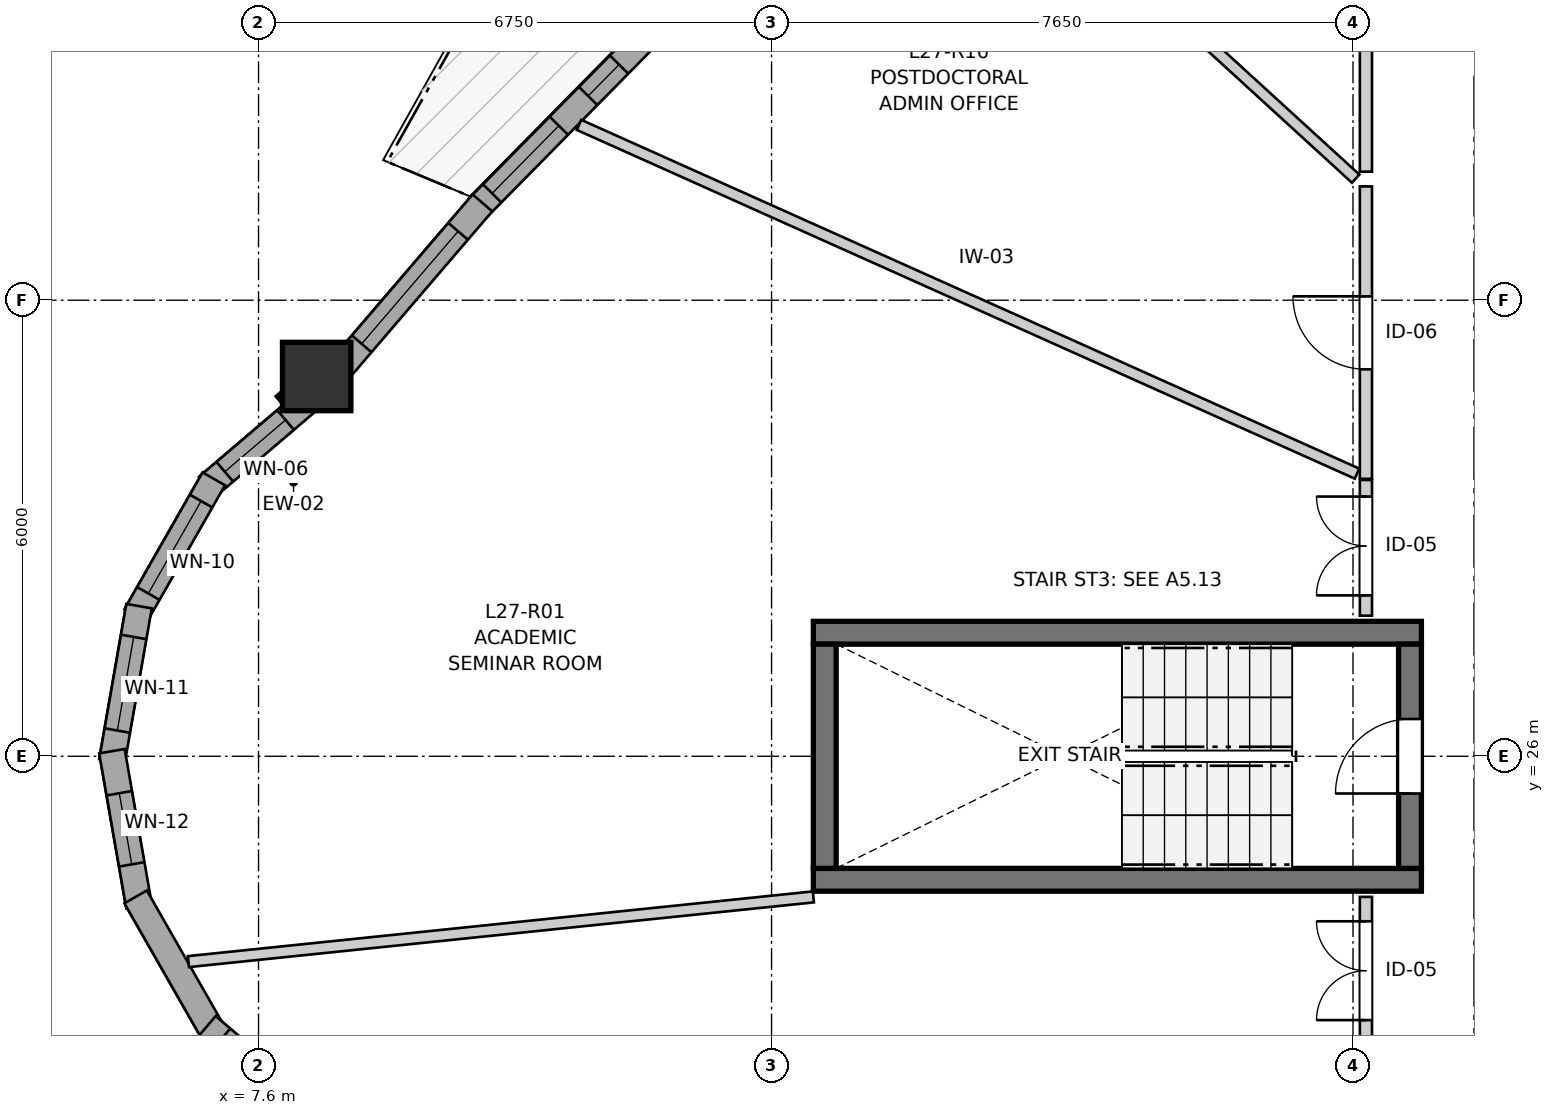
"""IFC4 building model, lengths in metres.
Left out: names, types, materials, properties, quantities, classifications, styles, units other than length and angle.
Written with IfcOpenShell. Run it as: python <this file> out.ifc"""

import sys

from ifc_helpers import new_model, si_unit, direction, frame, frame_2d, origin, origin_2d, place, context, subcontext, project, spatial, rectangle, extrude, source, transform, mapped, element, fill, save


model = new_model("IFC4")
c1 = context("Model", 3, precision=1e-05, world=origin(), true_north=direction((0.0, 1.0)))
c2 = subcontext(c1, "Body", "Model", "MODEL_VIEW")
j1 = project(units=[si_unit("LENGTHUNIT", "METRE"), si_unit("PLANEANGLEUNIT", "RADIAN")], contexts=[c1])
p1 = place(None, origin())
s1 = spatial("IfcSite", under=j1, at=p1, CompositionType="ELEMENT")
p2 = place(p1, origin())
s2 = spatial("IfcBuilding", under=s1, at=p2, CompositionType="ELEMENT")
p3 = place(p2, frame((0.0, 0.0, 92.8)))
s3 = spatial("IfcBuildingStorey", under=s2, at=p3, CompositionType="ELEMENT", Elevation=92.8)
for number, where, z_axis, x_axis in (
    (1, (14.9, 24.375, 0.0), (0.0, 0.0, 1.0), (1.0, 0.0, 0.0)),
    (2, (22.9, 27.625, 0.0), (0.0, 0.0, 1.0), (-1.0, 0.0, 0.0)),
):
    element("IfcWall", number, at=place(p3, frame(where, z_axis=z_axis, x_axis=x_axis)), inside=s3, PredefinedType="SHEAR", context=c2, shape_type="SweptSolid", body=[
        extrude(rectangle(XDim=8.0, YDim=0.3, at=frame_2d((4.0, 0.0))), origin(), (0.0, 0.0, 1.0), 2.95),
    ])
p4 = place(p3, frame((15.05, 27.475, 0.0), z_axis=(0.0, 0.0, 1.0), x_axis=(0.0, -1.0, 0.0)))
e3 = element("IfcWall", 3, at=p4, inside=s3, PredefinedType="SHEAR", context=c2, shape_type="SweptSolid", body=[
    extrude(rectangle(XDim=2.95, YDim=0.3, at=frame_2d((1.475, 0.0))), origin(), (0.0, 0.0, 1.0), 2.95),
])
p5 = place(p3, frame((22.75, 24.525, 0.0), z_axis=(0.0, 0.0, 1.0), x_axis=(0.0, 1.0, 0.0)))
e4 = element("IfcWall", 4, at=p5, inside=s3, PredefinedType="SHEAR", context=c2, shape_type="SweptSolid", body=[
    extrude(rectangle(XDim=2.95, YDim=0.3, at=frame_2d((1.475, 0.0))), origin(), (0.0, 0.0, 1.0), 2.95),
])
p6 = place(p5, frame((0.985, 0.0, 0.0)))
e5 = element("IfcOpeningElement", 5, at=p6, cuts=e4, PredefinedType="OPENING", context=c2, shape_type="SweptSolid", body=[
    extrude(rectangle(XDim=0.98, YDim=2.15, at=frame_2d((0.49, 1.075))), frame((0.0, 0.16, 0.0), z_axis=(0.0, -1.0, 0.0), x_axis=(1.0, 0.0, 0.0)), (0.0, 0.0, 1.0), 0.32),
])
m1 = source(origin(), c2, "Body", "SweptSolid", [
    extrude(rectangle(XDim=0.9, YDim=0.9, at=origin_2d()), origin(), (0.0, 0.0, 1.0), 2.95),
])
p7 = place(p3, frame((8.365, 30.996, 0.0), z_axis=(0.0, 0.0, 1.0), x_axis=(1.0, 0.0, 0.0)))
e6 = element("IfcColumn", 6, at=p7, inside=s3, PredefinedType="COLUMN", context=c2, shape_type="MappedRepresentation", body=[
    mapped(m1, transform((0.0, 0.0, 0.0), x_axis=(1.0, 0.0, 0.0), y_axis=(0.0, 1.0, 0.0), z_axis=(0.0, 0.0, 1.0), scale=1.0)),
])
p8 = place(p3, frame((8.3, 30.718, 0.0), z_axis=(0.0, 0.0, 1.0), x_axis=(-0.761191299493, -0.648527413126, 0.0)))
e7 = element("IfcWall", 7, at=p8, inside=s3, PredefinedType="SOLIDWALL", context=c2, shape_type="SweptSolid", body=[
    extrude(rectangle(XDim=1.805, YDim=0.34, at=frame_2d((0.903, 0.0))), origin(), (0.0, 0.0, 1.0), 2.48),
])
p9 = place(p8, frame((0.452, 0.0, 0.82)))
e8 = element("IfcOpeningElement", 8, at=p9, cuts=e7, PredefinedType="OPENING", context=c2, shape_type="SweptSolid", body=[
    extrude(rectangle(XDim=1.05, YDim=1.45, at=frame_2d((0.525, 0.725))), frame((0.0, 0.18, 0.0), z_axis=(0.0, -1.0, 0.0), x_axis=(1.0, 0.0, 0.0)), (0.0, 0.0, 1.0), 0.36),
])
p10 = place(p3, frame((7.011, 29.65, 0.0), z_axis=(0.0, 0.0, 1.0), x_axis=(-0.496037473582, -0.868301114132, 0.0)))
e9 = element("IfcWall", 9, at=p10, inside=s3, PredefinedType="SOLIDWALL", context=c2, shape_type="SweptSolid", body=[
    extrude(rectangle(XDim=2.073, YDim=0.34, at=frame_2d((1.037, 0.0))), origin(), (0.0, 0.0, 1.0), 2.48),
])
p11 = place(p10, frame((0.336, 0.0, 0.82)))
e10 = element("IfcOpeningElement", 10, at=p11, cuts=e9, PredefinedType="OPENING", context=c2, shape_type="SweptSolid", body=[
    extrude(rectangle(XDim=1.4, YDim=1.35, at=frame_2d((0.7, 0.675))), frame((0.0, 0.18, 0.0), z_axis=(0.0, -1.0, 0.0), x_axis=(1.0, 0.0, 0.0)), (0.0, 0.0, 1.0), 0.36),
])
p12 = place(p3, frame((6.028, 27.975, 0.0), z_axis=(0.0, 0.0, 1.0), x_axis=(-0.172186061474, -0.985064444711, 0.0)))
e11 = element("IfcWall", 11, at=p12, inside=s3, PredefinedType="SOLIDWALL", context=c2, shape_type="SweptSolid", body=[
    extrude(rectangle(XDim=2.073, YDim=0.34, at=frame_2d((1.037, 0.0))), origin(), (0.0, 0.0, 1.0), 2.48),
])
p13 = place(p12, frame((0.412, 0.0, 0.82)))
e12 = element("IfcOpeningElement", 12, at=p13, cuts=e11, PredefinedType="OPENING", context=c2, shape_type="SweptSolid", body=[
    extrude(rectangle(XDim=1.25, YDim=1.35, at=frame_2d((0.625, 0.675))), frame((0.0, 0.18, 0.0), z_axis=(0.0, -1.0, 0.0), x_axis=(1.0, 0.0, 0.0)), (0.0, 0.0, 1.0), 0.36),
])
p14 = place(p3, frame((5.671, 26.067, 0.0), z_axis=(0.0, 0.0, 1.0), x_axis=(0.172186061474, -0.985064444711, 0.0)))
e13 = element("IfcWall", 13, at=p14, inside=s3, PredefinedType="SOLIDWALL", context=c2, shape_type="SweptSolid", body=[
    extrude(rectangle(XDim=2.073, YDim=0.34, at=frame_2d((1.037, 0.0))), origin(), (0.0, 0.0, 1.0), 2.48),
])
p15 = place(p14, frame((0.562, 0.0, 0.82)))
e14 = element("IfcOpeningElement", 14, at=p15, cuts=e13, PredefinedType="OPENING", context=c2, shape_type="SweptSolid", body=[
    extrude(rectangle(XDim=0.95, YDim=1.35, at=frame_2d((0.475, 0.675))), frame((0.0, 0.18, 0.0), z_axis=(0.0, -1.0, 0.0), x_axis=(1.0, 0.0, 0.0)), (0.0, 0.0, 1.0), 0.36),
])
p16 = place(p3, frame((5.983, 24.15, 0.0), z_axis=(0.0, 0.0, 1.0), x_axis=(0.496037473582, -0.868301114132, 0.0)))
e15 = element("IfcWall", 15, at=p16, inside=s3, PredefinedType="SOLIDWALL", context=c2, shape_type="SweptSolid", body=[
    extrude(rectangle(XDim=2.073, YDim=0.34, at=frame_2d((1.037, 0.0))), origin(), (0.0, 0.0, 1.0), 2.48),
])
p17 = place(p3, frame((6.926, 22.453, 0.0), z_axis=(0.0, 0.0, 1.0), x_axis=(0.76114353683, -0.648583469063, 0.0)))
e16 = element("IfcWall", 16, at=p17, inside=s3, PredefinedType="SOLIDWALL", context=c2, shape_type="SweptSolid", body=[
    extrude(rectangle(XDim=2.015, YDim=0.34, at=frame_2d((1.007, 0.0))), origin(), (0.0, 0.0, 1.0), 2.48),
])
p18 = place(p17, frame((0.252, 0.0, 0.82)))
e17 = element("IfcOpeningElement", 17, at=p18, cuts=e16, PredefinedType="OPENING", context=c2, shape_type="SweptSolid", body=[
    extrude(rectangle(XDim=1.45, YDim=1.25, at=frame_2d((0.725, 0.625))), frame((0.0, 0.18, 0.0), z_axis=(0.0, -1.0, 0.0), x_axis=(1.0, 0.0, 0.0)), (0.0, 0.0, 1.0), 0.36),
])
p19 = place(p3, frame((12.641, 35.401, 0.0), z_axis=(0.0, 0.0, 1.0), x_axis=(-0.701955968499, -0.712220343917, 0.0)))
e18 = element("IfcWall", 18, at=p19, inside=s3, PredefinedType="SOLIDWALL", context=c2, shape_type="SweptSolid", body=[
    extrude(rectangle(XDim=3.068, YDim=0.34, at=frame_2d((1.534, 0.0))), origin(), (0.0, 0.0, 1.0), 2.48),
])
p20 = place(p19, frame((0.423, 0.0, 0.82)))
e19 = element("IfcOpeningElement", 19, at=p20, cuts=e18, PredefinedType="OPENING", context=c2, shape_type="SweptSolid", body=[
    extrude(rectangle(XDim=0.58, YDim=1.35, at=frame_2d((0.29, 0.675))), frame((0.0, 0.18, 0.0), z_axis=(0.0, -1.0, 0.0), x_axis=(1.0, 0.0, 0.0)), (0.0, 0.0, 1.0), 0.36),
])
p21 = place(p19, frame((1.552, 0.0, 0.82)))
e20 = element("IfcOpeningElement", 20, at=p21, cuts=e18, PredefinedType="OPENING", context=c2, shape_type="SweptSolid", body=[
    extrude(rectangle(XDim=1.25, YDim=1.35, at=frame_2d((0.625, 0.675))), frame((0.0, 0.18, 0.0), z_axis=(0.0, -1.0, 0.0), x_axis=(1.0, 0.0, 0.0)), (0.0, 0.0, 1.0), 0.36),
])
p22 = place(p3, frame((10.546, 33.28, 0.0), z_axis=(0.0, 0.0, 1.0), x_axis=(-0.6506950883, -0.759339121909, 0.0)))
e21 = element("IfcWall", 21, at=p22, inside=s3, PredefinedType="SOLIDWALL", context=c2, shape_type="SweptSolid", body=[
    extrude(rectangle(XDim=2.924, YDim=0.34, at=frame_2d((1.462, 0.0))), origin(), (0.0, 0.0, 1.0), 2.48),
])
p23 = place(p22, frame((0.492, 0.0, 0.82)))
e22 = element("IfcOpeningElement", 22, at=p23, cuts=e21, PredefinedType="OPENING", context=c2, shape_type="SweptSolid", body=[
    extrude(rectangle(XDim=1.95, YDim=1.4, at=frame_2d((0.975, 0.7))), frame((0.0, 0.18, 0.0), z_axis=(0.0, -1.0, 0.0), x_axis=(1.0, 0.0, 0.0)), (0.0, 0.0, 1.0), 0.36),
])
p24 = place(p3, frame((22.17, 29.65, 0.0), z_axis=(0.0, 0.0, 1.0), x_axis=(0.0, 1.0, 0.0)))
e23 = element("IfcWall", 23, at=p24, inside=s3, PredefinedType="PARTITIONING", context=c2, shape_type="SweptSolid", body=[
    extrude(rectangle(XDim=3.847, YDim=0.16, at=frame_2d((1.924, 0.0))), origin(), (0.0, 0.0, 1.0), 2.95),
])
p25 = place(p24, frame((1.441, 0.0, 0.0)))
e24 = element("IfcOpeningElement", 24, at=p25, cuts=e23, PredefinedType="OPENING", context=c2, shape_type="SweptSolid", body=[
    extrude(rectangle(XDim=0.96, YDim=2.1, at=frame_2d((0.48, 1.05))), frame((0.0, 0.09, 0.0), z_axis=(0.0, -1.0, 0.0), x_axis=(1.0, 0.0, 0.0)), (0.0, 0.0, 1.0), 0.18),
])
p26 = place(p3, frame((22.17, 22.164, 0.0), z_axis=(0.0, 0.0, 1.0), x_axis=(0.0, 1.0, 0.0)))
e25 = element("IfcWall", 25, at=p26, inside=s3, PredefinedType="PARTITIONING", context=c2, shape_type="SweptSolid", body=[
    extrude(rectangle(XDim=1.986, YDim=0.16, at=frame_2d((0.993, 0.0))), origin(), (0.0, 0.0, 1.0), 2.95),
])
p27 = place(p26, frame((0.365, 0.0, 0.0)))
e26 = element("IfcOpeningElement", 26, at=p27, cuts=e25, PredefinedType="OPENING", context=c2, shape_type="SweptSolid", body=[
    extrude(rectangle(XDim=1.3, YDim=2.1, at=frame_2d((0.65, 1.05))), frame((0.0, 0.09, 0.0), z_axis=(0.0, -1.0, 0.0), x_axis=(1.0, 0.0, 0.0)), (0.0, 0.0, 1.0), 0.18),
])
p28 = place(p3, frame((22.17, 27.85, 0.0), z_axis=(0.0, 0.0, 1.0), x_axis=(0.0, 1.0, 0.0)))
e27 = element("IfcWall", 27, at=p28, inside=s3, PredefinedType="PARTITIONING", context=c2, shape_type="SweptSolid", body=[
    extrude(rectangle(XDim=1.785, YDim=0.16, at=frame_2d((0.893, 0.0))), origin(), (0.0, 0.0, 1.0), 2.95),
])
p29 = place(p28, frame((0.267, 0.0, 0.0)))
e28 = element("IfcOpeningElement", 28, at=p29, cuts=e27, PredefinedType="OPENING", context=c2, shape_type="SweptSolid", body=[
    extrude(rectangle(XDim=1.3, YDim=2.1, at=frame_2d((0.65, 1.05))), frame((0.0, 0.09, 0.0), z_axis=(0.0, -1.0, 0.0), x_axis=(1.0, 0.0, 0.0)), (0.0, 0.0, 1.0), 0.18),
])
p30 = place(p3, frame((11.817, 34.307, 0.0), z_axis=(0.0, 0.0, 1.0), x_axis=(0.912528092457, -0.409014034572, 0.0)))
e29 = element("IfcWall", 29, at=p30, inside=s3, PredefinedType="PARTITIONING", context=c2, shape_type="SweptSolid", body=[
    extrude(rectangle(XDim=11.218, YDim=0.145, at=frame_2d((5.609, 0.0))), origin(), (0.0, 0.0, 1.0), 2.95),
])
p31 = place(p3, frame((6.678, 23.299, 0.0), z_axis=(0.0, 0.0, 1.0), x_axis=(0.994682199009, 0.102991858774, 0.0)))
e30 = element("IfcWall", 30, at=p31, inside=s3, PredefinedType="PARTITIONING", context=c2, shape_type="SweptSolid", body=[
    extrude(rectangle(XDim=8.266, YDim=0.145, at=frame_2d((4.133, 0.0))), origin(), (0.0, 0.0, 1.0), 2.95),
])
p32 = place(p3, frame((16.683, 38.491, 0.0), z_axis=(0.0, 0.0, 1.0), x_axis=(0.738145700324, -0.674641330704, 0.0)))
e31 = element("IfcWall", 31, at=p32, inside=s3, PredefinedType="PARTITIONING", context=c2, shape_type="SweptSolid", body=[
    extrude(rectangle(XDim=7.251, YDim=0.145, at=frame_2d((3.625, 0.0))), origin(), (0.0, 0.0, 1.0), 2.95),
])
p33 = place(p3, frame((22.17, 33.691, 0.0), z_axis=(0.0, 0.0, 1.0), x_axis=(0.0, 1.0, 0.0)))
e32 = element("IfcWall", 32, at=p33, inside=s3, PredefinedType="PARTITIONING", context=c2, shape_type="SweptSolid", body=[
    extrude(rectangle(XDim=2.651, YDim=0.16, at=frame_2d((1.325, 0.0))), origin(), (0.0, 0.0, 1.0), 2.95),
])
m2 = source(origin(), c2, "Body", "SweptSolid", [
    extrude(rectangle(XDim=1.05, YDim=1.45, at=frame_2d((0.525, 0.725))), frame((0.0, 0.03, 0.0), z_axis=(0.0, -1.0, 0.0), x_axis=(1.0, 0.0, 0.0)), (0.0, 0.0, 1.0), 0.06),
])
p34 = place(p9, origin())
e33 = element("IfcWindow", 33, at=p34, inside=s3, PartitioningType="SINGLE_PANEL", PredefinedType="WINDOW", context=c2, shape_type="MappedRepresentation", body=[
    mapped(m2, transform((0.0, 0.0, 0.0), x_axis=(1.0, 0.0, 0.0), y_axis=(0.0, 1.0, 0.0), z_axis=(0.0, 0.0, 1.0), scale=1.0)),
])
fill(e8, e33)
m3 = source(origin(), c2, "Body", "SweptSolid", [
    extrude(rectangle(XDim=1.4, YDim=1.35, at=frame_2d((0.7, 0.675))), frame((0.0, 0.03, 0.0), z_axis=(0.0, -1.0, 0.0), x_axis=(1.0, 0.0, 0.0)), (0.0, 0.0, 1.0), 0.06),
])
p35 = place(p11, origin())
e34 = element("IfcWindow", 34, at=p35, inside=s3, PartitioningType="SINGLE_PANEL", PredefinedType="WINDOW", context=c2, shape_type="MappedRepresentation", body=[
    mapped(m3, transform((0.0, 0.0, 0.0), x_axis=(1.0, 0.0, 0.0), y_axis=(0.0, 1.0, 0.0), z_axis=(0.0, 0.0, 1.0), scale=1.0)),
])
fill(e10, e34)
m4 = source(origin(), c2, "Body", "SweptSolid", [
    extrude(rectangle(XDim=1.25, YDim=1.35, at=frame_2d((0.625, 0.675))), frame((0.0, 0.03, 0.0), z_axis=(0.0, -1.0, 0.0), x_axis=(1.0, 0.0, 0.0)), (0.0, 0.0, 1.0), 0.06),
])
p36 = place(p13, origin())
e35 = element("IfcWindow", 35, at=p36, inside=s3, PartitioningType="SINGLE_PANEL", PredefinedType="WINDOW", context=c2, shape_type="MappedRepresentation", body=[
    mapped(m4, transform((0.0, 0.0, 0.0), x_axis=(1.0, 0.0, 0.0), y_axis=(0.0, 1.0, 0.0), z_axis=(0.0, 0.0, 1.0), scale=1.0)),
])
fill(e12, e35)
m5 = source(origin(), c2, "Body", "SweptSolid", [
    extrude(rectangle(XDim=0.95, YDim=1.35, at=frame_2d((0.475, 0.675))), frame((0.0, 0.03, 0.0), z_axis=(0.0, -1.0, 0.0), x_axis=(1.0, 0.0, 0.0)), (0.0, 0.0, 1.0), 0.06),
])
p37 = place(p15, origin())
e36 = element("IfcWindow", 36, at=p37, inside=s3, PartitioningType="SINGLE_PANEL", PredefinedType="WINDOW", context=c2, shape_type="MappedRepresentation", body=[
    mapped(m5, transform((0.0, 0.0, 0.0), x_axis=(1.0, 0.0, 0.0), y_axis=(0.0, 1.0, 0.0), z_axis=(0.0, 0.0, 1.0), scale=1.0)),
])
fill(e14, e36)
m6 = source(origin(), c2, "Body", "SweptSolid", [
    extrude(rectangle(XDim=0.58, YDim=1.35, at=frame_2d((0.29, 0.675))), frame((0.0, 0.03, 0.0), z_axis=(0.0, -1.0, 0.0), x_axis=(1.0, 0.0, 0.0)), (0.0, 0.0, 1.0), 0.06),
])
p38 = place(p20, origin())
e37 = element("IfcWindow", 37, at=p38, inside=s3, PartitioningType="SINGLE_PANEL", PredefinedType="WINDOW", context=c2, shape_type="MappedRepresentation", body=[
    mapped(m6, transform((0.0, 0.0, 0.0), x_axis=(1.0, 0.0, 0.0), y_axis=(0.0, 1.0, 0.0), z_axis=(0.0, 0.0, 1.0), scale=1.0)),
])
fill(e19, e37)
p39 = place(p21, origin())
e38 = element("IfcWindow", 38, at=p39, inside=s3, PartitioningType="SINGLE_PANEL", PredefinedType="WINDOW", context=c2, shape_type="MappedRepresentation", body=[
    mapped(m4, transform((0.0, 0.0, 0.0), x_axis=(1.0, 0.0, 0.0), y_axis=(0.0, 1.0, 0.0), z_axis=(0.0, 0.0, 1.0), scale=1.0)),
])
fill(e20, e38)
m7 = source(origin(), c2, "Body", "SweptSolid", [
    extrude(rectangle(XDim=1.95, YDim=1.4, at=frame_2d((0.975, 0.7))), frame((0.0, 0.03, 0.0), z_axis=(0.0, -1.0, 0.0), x_axis=(1.0, 0.0, 0.0)), (0.0, 0.0, 1.0), 0.06),
])
p40 = place(p23, origin())
e39 = element("IfcWindow", 39, at=p40, inside=s3, PartitioningType="SINGLE_PANEL", PredefinedType="WINDOW", context=c2, shape_type="MappedRepresentation", body=[
    mapped(m7, transform((0.0, 0.0, 0.0), x_axis=(1.0, 0.0, 0.0), y_axis=(0.0, 1.0, 0.0), z_axis=(0.0, 0.0, 1.0), scale=1.0)),
])
fill(e22, e39)
m8 = source(origin(), c2, "Body", "SweptSolid", [
    extrude(rectangle(XDim=0.98, YDim=2.15, at=frame_2d((0.49, 1.075))), frame((0.0, 0.025, 0.0), z_axis=(0.0, -1.0, 0.0), x_axis=(1.0, 0.0, 0.0)), (0.0, 0.0, 1.0), 0.05),
])
p41 = place(p6, origin())
e40 = element("IfcDoor", 40, at=p41, inside=s3, OperationType="SINGLE_SWING_LEFT", PredefinedType="DOOR", context=c2, shape_type="MappedRepresentation", body=[
    mapped(m8, transform((0.0, 0.0, 0.0), x_axis=(1.0, 0.0, 0.0), y_axis=(0.0, 1.0, 0.0), z_axis=(0.0, 0.0, 1.0), scale=1.0)),
])
fill(e5, e40)
m9 = source(origin(), c2, "Body", "SweptSolid", [
    extrude(rectangle(XDim=0.96, YDim=2.1, at=frame_2d((0.48, 1.05))), frame((0.0, 0.025, 0.0), z_axis=(0.0, -1.0, 0.0), x_axis=(1.0, 0.0, 0.0)), (0.0, 0.0, 1.0), 0.05),
])
p42 = place(p25, origin())
e41 = element("IfcDoor", 41, at=p42, inside=s3, OperationType="SINGLE_SWING_RIGHT", PredefinedType="DOOR", context=c2, shape_type="MappedRepresentation", body=[
    mapped(m9, transform((0.0, 0.0, 0.0), x_axis=(1.0, 0.0, 0.0), y_axis=(0.0, 1.0, 0.0), z_axis=(0.0, 0.0, 1.0), scale=1.0)),
])
fill(e24, e41)
m10 = source(origin(), c2, "Body", "SweptSolid", [
    extrude(rectangle(XDim=1.3, YDim=2.1, at=frame_2d((0.65, 1.05))), frame((0.0, 0.025, 0.0), z_axis=(0.0, -1.0, 0.0), x_axis=(1.0, 0.0, 0.0)), (0.0, 0.0, 1.0), 0.05),
])
p43 = place(p27, origin())
e42 = element("IfcDoor", 42, at=p43, inside=s3, OperationType="DOUBLE_DOOR_SINGLE_SWING", PredefinedType="DOOR", context=c2, shape_type="MappedRepresentation", body=[
    mapped(m10, transform((0.0, 0.0, 0.0), x_axis=(1.0, 0.0, 0.0), y_axis=(0.0, 1.0, 0.0), z_axis=(0.0, 0.0, 1.0), scale=1.0)),
])
fill(e26, e42)
p44 = place(p29, origin())
e43 = element("IfcDoor", 43, at=p44, inside=s3, OperationType="DOUBLE_DOOR_SINGLE_SWING", PredefinedType="DOOR", context=c2, shape_type="MappedRepresentation", body=[
    mapped(m10, transform((0.0, 0.0, 0.0), x_axis=(1.0, 0.0, 0.0), y_axis=(0.0, 1.0, 0.0), z_axis=(0.0, 0.0, 1.0), scale=1.0)),
])
fill(e28, e43)
save(model, sys.argv[1])
